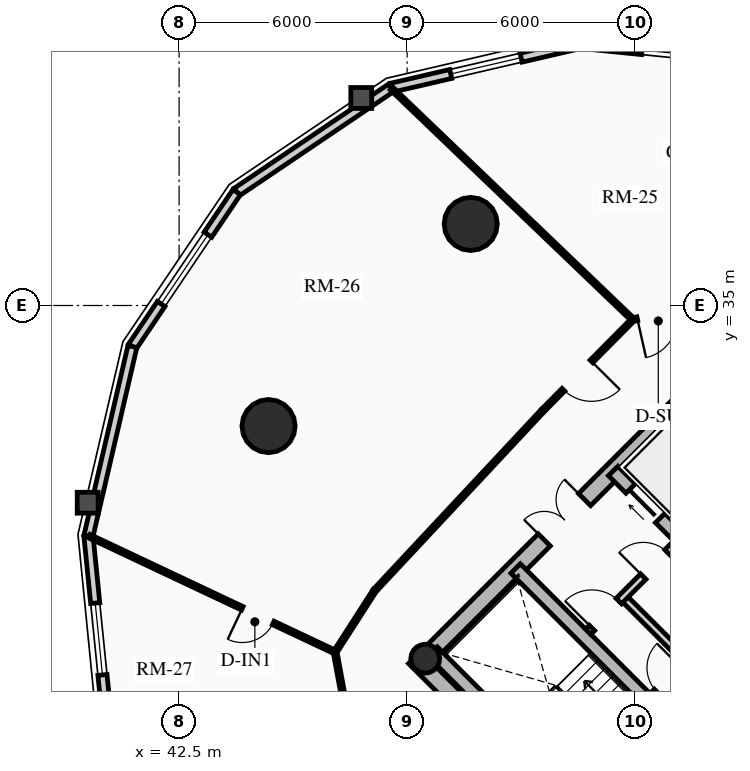
"""IFC4 building model, lengths in metres.
Left out: names, types, materials, properties, quantities, classifications, styles, units other than length and angle.
Written with IfcOpenShell. Run it as: python <this file> out.ifc"""

import sys

from ifc_helpers import new_model, si_unit, direction, frame, frame_2d, origin, origin_2d, place, context, subcontext, project, spatial, rectangle, circle, hollow_circle, extrude, source, transform, mapped, element, fill, save


model = new_model("IFC4")
c1 = context("Model", 3, precision=1e-05, world=origin(), true_north=direction((0.0, 1.0)))
c2 = subcontext(c1, "Body", "Model", "MODEL_VIEW")
j1 = project(units=[si_unit("LENGTHUNIT", "METRE"), si_unit("PLANEANGLEUNIT", "RADIAN")], contexts=[c1])
p1 = place(None, origin())
s1 = spatial("IfcSite", under=j1, at=p1, CompositionType="ELEMENT")
p2 = place(p1, origin())
s2 = spatial("IfcBuilding", under=s1, at=p2, CompositionType="ELEMENT")
p3 = place(p2, frame((0.0, 0.0, 99.25)))
s3 = spatial("IfcBuildingStorey", under=s2, at=p3, CompositionType="ELEMENT", Elevation=99.25)
p4 = place(p3, frame((58.737, 15.697, 0.0), z_axis=(0.0, 0.0, 1.0), x_axis=(-0.707106781187, 0.707106781187, 0.0)))
e1 = element("IfcWall", 1, at=p4, inside=s3, PredefinedType="SHEAR", context=c2, shape_type="SweptSolid", body=[
    extrude(rectangle(XDim=14.2, YDim=0.45, at=frame_2d((7.1, 0.0))), origin(), (0.0, 0.0, 1.0), 2.91),
])
p5 = place(p3, frame((48.856, 25.578, 0.0), z_axis=(0.0, 0.0, 1.0), x_axis=(0.707106781187, 0.707106781187, 0.0)))
e2 = element("IfcWall", 2, at=p5, inside=s3, PredefinedType="SHEAR", context=c2, shape_type="SweptSolid", body=[
    extrude(rectangle(XDim=10.7, YDim=0.45, at=frame_2d((5.35, 0.0))), origin(), (0.0, 0.0, 1.0), 2.91),
])
m1 = source(origin(), c2, "Body", "SweptSolid", [
    extrude(rectangle(XDim=1.5, YDim=2.02, at=frame_2d((0.75, 1.01))), frame((0.0, 0.235, 0.0), z_axis=(0.0, -1.0, 0.0), x_axis=(1.0, 0.0, 0.0)), (0.0, 0.0, 1.0), 0.47),
])
p6 = place(p5, frame((4.6, 0.0, 0.0)))
e3 = element("IfcOpeningElement", 3, at=p6, cuts=e2, PredefinedType="OPENING", context=c2, shape_type="MappedRepresentation", body=[
    mapped(m1, transform((0.0, 0.0, 0.0), x_axis=(1.0, 0.0, 0.0), y_axis=(0.0, 1.0, 0.0), z_axis=(0.0, 0.0, 1.0), scale=1.0)),
])
p7 = place(p3, frame((61.078, 18.355, 0.0), z_axis=(0.0, 0.0, 1.0), x_axis=(-0.707106781187, 0.707106781187, 0.0)))
e4 = element("IfcWall", 4, at=p7, inside=s3, PredefinedType="SHEAR", context=c2, shape_type="SweptSolid", body=[
    extrude(rectangle(XDim=13.75, YDim=0.35, at=frame_2d((6.875, 0.0))), origin(), (0.0, 0.0, 1.0), 2.91),
])
m2 = source(origin(), c2, "Body", "SweptSolid", [
    extrude(rectangle(XDim=1.1, YDim=2.015, at=frame_2d((0.55, 1.007))), frame((0.0, 0.185, 0.0), z_axis=(0.0, -1.0, 0.0), x_axis=(1.0, 0.0, 0.0)), (0.0, 0.0, 1.0), 0.37),
])
p8 = place(p7, frame((4.875, 0.0, 0.0)))
e5 = element("IfcOpeningElement", 5, at=p8, cuts=e4, PredefinedType="OPENING", context=c2, shape_type="MappedRepresentation", body=[
    mapped(m2, transform((0.0, 0.0, 0.0), x_axis=(1.0, 0.0, 0.0), y_axis=(0.0, 1.0, 0.0), z_axis=(0.0, 0.0, 1.0), scale=1.0)),
])
m3 = source(origin(), c2, "Body", "SweptSolid", [
    extrude(rectangle(XDim=1.15, YDim=2.02, at=frame_2d((0.575, 1.01))), frame((0.0, 0.185, 0.0), z_axis=(0.0, -1.0, 0.0), x_axis=(1.0, 0.0, 0.0)), (0.0, 0.0, 1.0), 0.37),
])
p9 = place(p7, frame((7.295, 0.0, 0.0)))
e6 = element("IfcOpeningElement", 6, at=p9, cuts=e4, PredefinedType="OPENING", context=c2, shape_type="MappedRepresentation", body=[
    mapped(m3, transform((0.0, 0.0, 0.0), x_axis=(1.0, 0.0, 0.0), y_axis=(0.0, 1.0, 0.0), z_axis=(0.0, 0.0, 1.0), scale=1.0)),
])
p10 = place(p3, frame((63.645, 20.922, 0.0), z_axis=(0.0, 0.0, 1.0), x_axis=(-0.707106781187, 0.707106781187, 0.0)))
e7 = element("IfcWall", 7, at=p10, inside=s3, PredefinedType="SHEAR", context=c2, shape_type="SweptSolid", body=[
    extrude(rectangle(XDim=13.75, YDim=0.35, at=frame_2d((6.875, 0.0))), origin(), (0.0, 0.0, 1.0), 2.91),
])
p11 = place(p10, frame((10.0, 0.0, 0.0)))
e8 = element("IfcOpeningElement", 8, at=p11, cuts=e7, PredefinedType="OPENING", context=c2, shape_type="MappedRepresentation", body=[
    mapped(m2, transform((0.0, 0.0, 0.0), x_axis=(1.0, 0.0, 0.0), y_axis=(0.0, 1.0, 0.0), z_axis=(0.0, 0.0, 1.0), scale=1.0)),
])
p12 = place(p10, frame((12.0, 0.0, 0.0)))
e9 = element("IfcOpeningElement", 9, at=p12, cuts=e7, PredefinedType="OPENING", context=c2, shape_type="MappedRepresentation", body=[
    mapped(m2, transform((0.0, 0.0, 0.0), x_axis=(1.0, 0.0, 0.0), y_axis=(0.0, 1.0, 0.0), z_axis=(0.0, 0.0, 1.0), scale=1.0)),
])
p13 = place(p10, frame((5.305, 0.0, 0.0)))
e10 = element("IfcOpeningElement", 10, at=p13, cuts=e7, PredefinedType="OPENING", context=c2, shape_type="MappedRepresentation", body=[
    mapped(m3, transform((0.0, 0.0, 0.0), x_axis=(1.0, 0.0, 0.0), y_axis=(0.0, 1.0, 0.0), z_axis=(0.0, 0.0, 1.0), scale=1.0)),
])
p14 = place(p3, frame((53.922, 21.141, 0.0), z_axis=(0.0, 0.0, 1.0), x_axis=(-0.707088616009, 0.707124945897, 0.0)))
e11 = element("IfcWall", 11, at=p14, inside=s3, PredefinedType="SHEAR", context=c2, shape_type="SweptSolid", body=[
    extrude(rectangle(XDim=6.72, YDim=0.35, at=frame_2d((3.36, 0.0))), origin(), (0.0, 0.0, 1.0), 2.91),
])
p15 = place(p3, frame((48.976, 25.706, 0.0), z_axis=(0.0, 0.0, 1.0), x_axis=(0.707106781187, 0.707106781187, 0.0)))
e12 = element("IfcColumn", 12, at=p15, inside=s3, PredefinedType="COLUMN", context=c2, shape_type="SweptSolid", body=[
    extrude(hollow_circle(Radius=0.38, WallThickness=0.032, at=origin_2d()), origin(), (0.0, 0.0, 1.0), 2.91),
])
for number, where, z_axis, x_axis in (
    (13, (50.173, 37.146, 0.0), (0.0, 0.0, 1.0), (1.0, 0.0, 0.0)),
    (14, (44.854, 31.827, 0.0), (0.0, 0.0, 1.0), (1.0, 0.0, 0.0)),
):
    element("IfcColumn", number, at=place(p3, frame(where, z_axis=z_axis, x_axis=x_axis)), inside=s3, PredefinedType="USERDEFINED", context=c2, shape_type="SweptSolid", body=[
        extrude(circle(Radius=0.7, at=origin_2d()), origin(), (0.0, 0.0, 1.0), 2.91),
    ])
p16 = place(p3, frame((53.067, 41.885, 0.0), z_axis=(0.0, 0.0, 1.0), x_axis=(0.994971754311, -0.10015591906, 0.0)))
e15 = element("IfcWall", 15, at=p16, inside=s3, PredefinedType="SOLIDWALL", context=c2, shape_type="SweptSolid", body=[
    extrude(rectangle(XDim=5.448, YDim=0.24, at=frame_2d((2.724, 0.0))), origin(), (0.0, 0.0, 1.0), 2.179),
])
m4 = source(origin(), c2, "Body", "SweptSolid", [
    extrude(rectangle(XDim=2.2, YDim=1.35, at=frame_2d((1.1, 0.675))), frame((0.0, 0.13, 0.0), z_axis=(0.0, -1.0, 0.0), x_axis=(1.0, 0.0, 0.0)), (0.0, 0.0, 1.0), 0.26),
])
p17 = place(p16, frame((1.624, 0.0, 0.65)))
e16 = element("IfcOpeningElement", 16, at=p17, cuts=e15, PredefinedType="OPENING", context=c2, shape_type="MappedRepresentation", body=[
    mapped(m4, transform((0.0, 0.0, 0.0), x_axis=(1.0, 0.0, 0.0), y_axis=(0.0, 1.0, 0.0), z_axis=(0.0, 0.0, 1.0), scale=1.0)),
])
p18 = place(p3, frame((48.08, 40.729, 0.0), z_axis=(0.0, 0.0, 1.0), x_axis=(0.974165631126, 0.225834725257, 0.0)))
e17 = element("IfcWall", 17, at=p18, inside=s3, PredefinedType="SOLIDWALL", context=c2, shape_type="SweptSolid", body=[
    extrude(rectangle(XDim=5.119, YDim=0.24, at=frame_2d((2.56, 0.0))), origin(), (0.0, 0.0, 1.0), 2.179),
])
m5 = source(origin(), c2, "Body", "SweptSolid", [
    extrude(rectangle(XDim=1.9, YDim=1.35, at=frame_2d((0.95, 0.675))), frame((0.0, 0.13, 0.0), z_axis=(0.0, -1.0, 0.0), x_axis=(1.0, 0.0, 0.0)), (0.0, 0.0, 1.0), 0.26),
])
p19 = place(p18, frame((1.609, 0.0, 0.65)))
e18 = element("IfcOpeningElement", 18, at=p19, cuts=e17, PredefinedType="OPENING", context=c2, shape_type="MappedRepresentation", body=[
    mapped(m5, transform((0.0, 0.0, 0.0), x_axis=(1.0, 0.0, 0.0), y_axis=(0.0, 1.0, 0.0), z_axis=(0.0, 0.0, 1.0), scale=1.0)),
])
p20 = place(p3, frame((44.015, 37.985, 0.0), z_axis=(0.0, 0.0, 1.0), x_axis=(0.828781148131, 0.559572880421, 0.0)))
e19 = element("IfcWall", 19, at=p20, inside=s3, PredefinedType="SOLIDWALL", context=c2, shape_type="SweptSolid", body=[
    extrude(rectangle(XDim=4.905, YDim=0.24, at=frame_2d((2.452, 0.0))), origin(), (0.0, 0.0, 1.0), 2.179),
])
p21 = place(p3, frame((41.271, 33.92, 0.0), z_axis=(0.0, 0.0, 1.0), x_axis=(0.559572880421, 0.828781148131, 0.0)))
e20 = element("IfcWall", 20, at=p21, inside=s3, PredefinedType="SOLIDWALL", context=c2, shape_type="SweptSolid", body=[
    extrude(rectangle(XDim=4.905, YDim=0.24, at=frame_2d((2.452, 0.0))), origin(), (0.0, 0.0, 1.0), 2.179),
])
p22 = place(p21, frame((1.352, 0.0, 0.65)))
e21 = element("IfcOpeningElement", 21, at=p22, cuts=e20, PredefinedType="OPENING", context=c2, shape_type="MappedRepresentation", body=[
    mapped(m4, transform((0.0, 0.0, 0.0), x_axis=(1.0, 0.0, 0.0), y_axis=(0.0, 1.0, 0.0), z_axis=(0.0, 0.0, 1.0), scale=1.0)),
])
p23 = place(p3, frame((40.115, 28.933, 0.0), z_axis=(0.0, 0.0, 1.0), x_axis=(0.225834725257, 0.974165631126, 0.0)))
e22 = element("IfcWall", 22, at=p23, inside=s3, PredefinedType="SOLIDWALL", context=c2, shape_type="SweptSolid", body=[
    extrude(rectangle(XDim=5.119, YDim=0.24, at=frame_2d((2.56, 0.0))), origin(), (0.0, 0.0, 1.0), 2.179),
])
p24 = place(p3, frame((40.661, 23.513, 0.0), z_axis=(0.0, 0.0, 1.0), x_axis=(-0.10015591906, 0.994971754311, 0.0)))
e23 = element("IfcWall", 23, at=p24, inside=s3, PredefinedType="SOLIDWALL", context=c2, shape_type="SweptSolid", body=[
    extrude(rectangle(XDim=5.448, YDim=0.24, at=frame_2d((2.724, 0.0))), origin(), (0.0, 0.0, 1.0), 2.179),
])
p25 = place(p24, frame((1.774, 0.0, 0.65)))
e24 = element("IfcOpeningElement", 24, at=p25, cuts=e23, PredefinedType="OPENING", context=c2, shape_type="MappedRepresentation", body=[
    mapped(m5, transform((0.0, 0.0, 0.0), x_axis=(1.0, 0.0, 0.0), y_axis=(0.0, 1.0, 0.0), z_axis=(0.0, 0.0, 1.0), scale=1.0)),
])
p26 = place(p3, frame((54.961, 24.719, 0.0), z_axis=(0.0, 0.0, 1.0), x_axis=(0.707106781187, 0.707106781187, 0.0)))
e25 = element("IfcWall", 25, at=p26, inside=s3, PredefinedType="PARTITIONING", context=c2, shape_type="SweptSolid", body=[
    extrude(rectangle(XDim=3.28, YDim=0.2, at=frame_2d((1.64, 0.0))), origin(), (0.0, 0.0, 1.0), 2.655),
])
m6 = source(origin(), c2, "Body", "SweptSolid", [
    extrude(rectangle(XDim=0.9, YDim=2.005, at=frame_2d((0.45, 1.002))), frame((0.0, 0.11, 0.0), z_axis=(0.0, -1.0, 0.0), x_axis=(1.0, 0.0, 0.0)), (0.0, 0.0, 1.0), 0.22),
])
p27 = place(p26, frame((0.16, 0.0, 0.0)))
e26 = element("IfcOpeningElement", 26, at=p27, cuts=e25, PredefinedType="OPENING", context=c2, shape_type="MappedRepresentation", body=[
    mapped(m6, transform((0.0, 0.0, 0.0), x_axis=(1.0, 0.0, 0.0), y_axis=(0.0, 1.0, 0.0), z_axis=(0.0, 0.0, 1.0), scale=1.0)),
])
p28 = place(p3, frame((55.874, 25.631, 0.0), z_axis=(0.0, 0.0, 1.0), x_axis=(-0.707157639372, 0.707055919343, 0.0)))
e27 = element("IfcWall", 27, at=p28, inside=s3, PredefinedType="PARTITIONING", context=c2, shape_type="SweptSolid", body=[
    extrude(rectangle(XDim=2.4, YDim=0.2, at=frame_2d((1.2, 0.0))), origin(), (0.0, 0.0, 1.0), 2.655),
])
p29 = place(p3, frame((53.264, 26.416, 0.0), z_axis=(0.0, 0.0, 1.0), x_axis=(0.707106781187, 0.707106781187, 0.0)))
e28 = element("IfcWall", 28, at=p29, inside=s3, PredefinedType="PARTITIONING", context=c2, shape_type="SweptSolid", body=[
    extrude(rectangle(XDim=3.28, YDim=0.2, at=frame_2d((1.64, 0.0))), origin(), (0.0, 0.0, 1.0), 2.655),
])
m7 = source(origin(), c2, "Body", "SweptSolid", [
    extrude(rectangle(XDim=1.0, YDim=2.015, at=frame_2d((0.5, 1.007))), frame((0.0, 0.11, 0.0), z_axis=(0.0, -1.0, 0.0), x_axis=(1.0, 0.0, 0.0)), (0.0, 0.0, 1.0), 0.22),
])
p30 = place(p29, frame((0.14, 0.0, 0.0)))
e29 = element("IfcOpeningElement", 29, at=p30, cuts=e28, PredefinedType="OPENING", context=c2, shape_type="MappedRepresentation", body=[
    mapped(m7, transform((0.0, 0.0, 0.0), x_axis=(1.0, 0.0, 0.0), y_axis=(0.0, 1.0, 0.0), z_axis=(0.0, 0.0, 1.0), scale=1.0)),
])
p31 = place(p29, frame((2.05, 0.0, 0.0)))
e30 = element("IfcOpeningElement", 30, at=p31, cuts=e28, PredefinedType="OPENING", context=c2, shape_type="MappedRepresentation", body=[
    mapped(m6, transform((0.0, 0.0, 0.0), x_axis=(1.0, 0.0, 0.0), y_axis=(0.0, 1.0, 0.0), z_axis=(0.0, 0.0, 1.0), scale=1.0)),
])
p32 = place(p3, frame((55.988, 34.974, 0.0), z_axis=(0.0, 0.0, 1.0), x_axis=(-0.975666565154, -0.219259557695, 0.0)))
e31 = element("IfcWall", 31, at=p32, inside=s3, PredefinedType="MOVABLE", context=c2, shape_type="SweptSolid", body=[
    extrude(rectangle(XDim=1.587, YDim=0.1, at=frame_2d((0.793, 0.0))), origin(), (0.0, 0.0, 1.0), 2.225),
])
m8 = source(origin(), c2, "Body", "SweptSolid", [
    extrude(rectangle(XDim=1.05, YDim=2.015, at=frame_2d((0.525, 1.007))), frame((0.0, 0.06, 0.0), z_axis=(0.0, -1.0, 0.0), x_axis=(1.0, 0.0, 0.0)), (0.0, 0.0, 1.0), 0.12),
])
p33 = place(p32, frame((0.417, 0.0, 0.0)))
e32 = element("IfcOpeningElement", 32, at=p33, cuts=e31, PredefinedType="OPENING", context=c2, shape_type="MappedRepresentation", body=[
    mapped(m8, transform((0.0, 0.0, 0.0), x_axis=(1.0, 0.0, 0.0), y_axis=(0.0, 1.0, 0.0), z_axis=(0.0, 0.0, 1.0), scale=1.0)),
])
p34 = place(p3, frame((54.44, 34.626, 0.0), z_axis=(0.0, 0.0, 1.0), x_axis=(-0.703978840546, -0.710220945948, 0.0)))
e33 = element("IfcWall", 33, at=p34, inside=s3, PredefinedType="MOVABLE", context=c2, shape_type="SweptSolid", body=[
    extrude(rectangle(XDim=3.364, YDim=0.1, at=frame_2d((1.682, 0.0))), origin(), (0.0, 0.0, 1.0), 2.225),
])
p35 = place(p34, frame((1.546, 0.0, 0.0)))
e34 = element("IfcOpeningElement", 34, at=p35, cuts=e33, PredefinedType="OPENING", context=c2, shape_type="MappedRepresentation", body=[
    mapped(m8, transform((0.0, 0.0, 0.0), x_axis=(1.0, 0.0, 0.0), y_axis=(0.0, 1.0, 0.0), z_axis=(0.0, 0.0, 1.0), scale=1.0)),
])
p36 = place(p3, frame((52.072, 32.237, 0.0), z_axis=(0.0, 0.0, 1.0), x_axis=(-0.682528774423, -0.730858722383, 0.0)))
e35 = element("IfcWall", 35, at=p36, inside=s3, PredefinedType="MOVABLE", context=c2, shape_type="SweptSolid", body=[
    extrude(rectangle(XDim=6.486, YDim=0.1, at=frame_2d((3.243, 0.0))), origin(), (0.0, 0.0, 1.0), 2.225),
])
p37 = place(p3, frame((47.645, 27.497, 0.0), z_axis=(0.0, 0.0, 1.0), x_axis=(-0.540680612097, -0.841227957038, 0.0)))
e36 = element("IfcWall", 36, at=p37, inside=s3, PredefinedType="MOVABLE", context=c2, shape_type="SweptSolid", body=[
    extrude(rectangle(XDim=1.924, YDim=0.1, at=frame_2d((0.962, 0.0))), origin(), (0.0, 0.0, 1.0), 2.225),
])
p38 = place(p3, frame((46.605, 25.879, 0.0), z_axis=(0.0, 0.0, 1.0), x_axis=(0.182019785456, -0.983294868136, 0.0)))
e37 = element("IfcWall", 37, at=p38, inside=s3, PredefinedType="MOVABLE", context=c2, shape_type="SweptSolid", body=[
    extrude(rectangle(XDim=1.384, YDim=0.1, at=frame_2d((0.692, 0.0))), origin(), (0.0, 0.0, 1.0), 2.225),
])
p39 = place(p3, frame((54.44, 34.626, 0.0), z_axis=(0.0, 0.0, 1.0), x_axis=(-0.722045979822, 0.691845071547, 0.0)))
e38 = element("IfcWall", 38, at=p39, inside=s3, PredefinedType="MOVABLE", context=c2, shape_type="SweptSolid", body=[
    extrude(rectangle(XDim=8.795, YDim=0.1, at=frame_2d((4.397, 0.0))), origin(), (0.0, 0.0, 1.0), 2.179),
])
p40 = place(p3, frame((46.605, 25.879, 0.0), z_axis=(0.0, 0.0, 1.0), x_axis=(-0.904450971726, 0.426577589359, 0.0)))
e39 = element("IfcWall", 39, at=p40, inside=s3, PredefinedType="MOVABLE", context=c2, shape_type="SweptSolid", body=[
    extrude(rectangle(XDim=7.154, YDim=0.1, at=frame_2d((3.577, 0.0))), origin(), (0.0, 0.0, 1.0), 2.179),
])
m9 = source(origin(), c2, "Body", "SweptSolid", [
    extrude(rectangle(XDim=0.9, YDim=2.005, at=frame_2d((0.45, 1.002))), frame((0.0, 0.06, 0.0), z_axis=(0.0, -1.0, 0.0), x_axis=(1.0, 0.0, 0.0)), (0.0, 0.0, 1.0), 0.12),
])
p41 = place(p40, frame((1.8, 0.0, 0.0)))
e40 = element("IfcOpeningElement", 40, at=p41, cuts=e39, PredefinedType="OPENING", context=c2, shape_type="MappedRepresentation", body=[
    mapped(m9, transform((0.0, 0.0, 0.0), x_axis=(1.0, 0.0, 0.0), y_axis=(0.0, 1.0, 0.0), z_axis=(0.0, 0.0, 1.0), scale=1.0)),
])
m10 = source(origin(), c2, "Body", "SweptSolid", [
    extrude(rectangle(XDim=2.2, YDim=1.35, at=frame_2d((1.1, 0.675))), frame((0.0, 0.03, 0.0), z_axis=(0.0, -1.0, 0.0), x_axis=(1.0, 0.0, 0.0)), (0.0, 0.0, 1.0), 0.06),
])
p42 = place(p17, origin())
e41 = element("IfcWindow", 41, at=p42, inside=s3, PartitioningType="DOUBLE_PANEL_VERTICAL", PredefinedType="WINDOW", context=c2, shape_type="MappedRepresentation", body=[
    mapped(m10, transform((0.0, 0.0, 0.0), x_axis=(1.0, 0.0, 0.0), y_axis=(0.0, 1.0, 0.0), z_axis=(0.0, 0.0, 1.0), scale=1.0)),
])
fill(e16, e41)
m11 = source(origin(), c2, "Body", "SweptSolid", [
    extrude(rectangle(XDim=1.9, YDim=1.35, at=frame_2d((0.95, 0.675))), frame((0.0, 0.03, 0.0), z_axis=(0.0, -1.0, 0.0), x_axis=(1.0, 0.0, 0.0)), (0.0, 0.0, 1.0), 0.06),
])
p43 = place(p19, origin())
e42 = element("IfcWindow", 42, at=p43, inside=s3, PartitioningType="DOUBLE_PANEL_VERTICAL", PredefinedType="WINDOW", context=c2, shape_type="MappedRepresentation", body=[
    mapped(m11, transform((0.0, 0.0, 0.0), x_axis=(1.0, 0.0, 0.0), y_axis=(0.0, 1.0, 0.0), z_axis=(0.0, 0.0, 1.0), scale=1.0)),
])
fill(e18, e42)
p44 = place(p22, origin())
e43 = element("IfcWindow", 43, at=p44, inside=s3, PartitioningType="DOUBLE_PANEL_VERTICAL", PredefinedType="WINDOW", context=c2, shape_type="MappedRepresentation", body=[
    mapped(m10, transform((0.0, 0.0, 0.0), x_axis=(1.0, 0.0, 0.0), y_axis=(0.0, 1.0, 0.0), z_axis=(0.0, 0.0, 1.0), scale=1.0)),
])
fill(e21, e43)
p45 = place(p25, origin())
e44 = element("IfcWindow", 44, at=p45, inside=s3, PartitioningType="DOUBLE_PANEL_VERTICAL", PredefinedType="WINDOW", context=c2, shape_type="MappedRepresentation", body=[
    mapped(m11, transform((0.0, 0.0, 0.0), x_axis=(1.0, 0.0, 0.0), y_axis=(0.0, 1.0, 0.0), z_axis=(0.0, 0.0, 1.0), scale=1.0)),
])
fill(e24, e44)
m12 = source(origin(), c2, "Body", "SweptSolid", [
    extrude(rectangle(XDim=1.1, YDim=2.015, at=frame_2d((0.55, 1.007))), frame((0.0, 0.025, 0.0), z_axis=(0.0, -1.0, 0.0), x_axis=(1.0, 0.0, 0.0)), (0.0, 0.0, 1.0), 0.05),
])
p46 = place(p12, origin())
e45 = element("IfcDoor", 45, at=p46, inside=s3, OperationType="SLIDING_TO_RIGHT", PredefinedType="DOOR", context=c2, shape_type="MappedRepresentation", body=[
    mapped(m12, transform((0.0, 0.0, 0.0), x_axis=(1.0, 0.0, 0.0), y_axis=(0.0, 1.0, 0.0), z_axis=(0.0, 0.0, 1.0), scale=1.0)),
])
fill(e9, e45)
m13 = source(origin(), c2, "Body", "SweptSolid", [
    extrude(rectangle(XDim=1.5, YDim=2.02, at=frame_2d((0.75, 1.01))), frame((0.0, 0.025, 0.0), z_axis=(0.0, -1.0, 0.0), x_axis=(1.0, 0.0, 0.0)), (0.0, 0.0, 1.0), 0.05),
])
p47 = place(p6, origin())
e46 = element("IfcDoor", 46, at=p47, inside=s3, OperationType="DOUBLE_DOOR_SINGLE_SWING", PredefinedType="DOOR", context=c2, shape_type="MappedRepresentation", body=[
    mapped(m13, transform((0.0, 0.0, 0.0), x_axis=(1.0, 0.0, 0.0), y_axis=(0.0, 1.0, 0.0), z_axis=(0.0, 0.0, 1.0), scale=1.0)),
])
fill(e3, e46)
m14 = source(origin(), c2, "Body", "SweptSolid", [
    extrude(rectangle(XDim=0.9, YDim=2.005, at=frame_2d((0.45, 1.002))), frame((0.0, 0.025, 0.0), z_axis=(0.0, -1.0, 0.0), x_axis=(1.0, 0.0, 0.0)), (0.0, 0.0, 1.0), 0.05),
])
p48 = place(p27, origin())
e47 = element("IfcDoor", 47, at=p48, inside=s3, OperationType="SINGLE_SWING_RIGHT", PredefinedType="DOOR", context=c2, shape_type="MappedRepresentation", body=[
    mapped(m14, transform((0.0, 0.0, 0.0), x_axis=(1.0, 0.0, 0.0), y_axis=(0.0, 1.0, 0.0), z_axis=(0.0, 0.0, 1.0), scale=1.0)),
])
fill(e26, e47)
m15 = source(origin(), c2, "Body", "SweptSolid", [
    extrude(rectangle(XDim=1.0, YDim=2.015, at=frame_2d((0.5, 1.007))), frame((0.0, 0.025, 0.0), z_axis=(0.0, -1.0, 0.0), x_axis=(1.0, 0.0, 0.0)), (0.0, 0.0, 1.0), 0.05),
])
p49 = place(p30, origin())
e48 = element("IfcDoor", 48, at=p49, inside=s3, OperationType="SINGLE_SWING_LEFT", PredefinedType="DOOR", context=c2, shape_type="MappedRepresentation", body=[
    mapped(m15, transform((0.0, 0.0, 0.0), x_axis=(1.0, 0.0, 0.0), y_axis=(0.0, 1.0, 0.0), z_axis=(0.0, 0.0, 1.0), scale=1.0)),
])
fill(e29, e48)
p50 = place(p31, origin())
e49 = element("IfcDoor", 49, at=p50, inside=s3, OperationType="SINGLE_SWING_LEFT", PredefinedType="DOOR", context=c2, shape_type="MappedRepresentation", body=[
    mapped(m14, transform((0.0, 0.0, 0.0), x_axis=(1.0, 0.0, 0.0), y_axis=(0.0, 1.0, 0.0), z_axis=(0.0, 0.0, 1.0), scale=1.0)),
])
fill(e30, e49)
m16 = source(origin(), c2, "Body", "SweptSolid", [
    extrude(rectangle(XDim=1.05, YDim=2.015, at=frame_2d((0.525, 1.007))), frame((0.0, 0.025, 0.0), z_axis=(0.0, -1.0, 0.0), x_axis=(1.0, 0.0, 0.0)), (0.0, 0.0, 1.0), 0.05),
])
p51 = place(p33, origin())
e50 = element("IfcDoor", 50, at=p51, inside=s3, OperationType="SINGLE_SWING_RIGHT", PredefinedType="DOOR", context=c2, shape_type="MappedRepresentation", body=[
    mapped(m16, transform((0.0, 0.0, 0.0), x_axis=(1.0, 0.0, 0.0), y_axis=(0.0, 1.0, 0.0), z_axis=(0.0, 0.0, 1.0), scale=1.0)),
])
fill(e32, e50)
p52 = place(p35, origin())
e51 = element("IfcDoor", 51, at=p52, inside=s3, OperationType="SINGLE_SWING_LEFT", PredefinedType="DOOR", context=c2, shape_type="MappedRepresentation", body=[
    mapped(m16, transform((0.0, 0.0, 0.0), x_axis=(1.0, 0.0, 0.0), y_axis=(0.0, 1.0, 0.0), z_axis=(0.0, 0.0, 1.0), scale=1.0)),
])
fill(e34, e51)
p53 = place(p41, origin())
e52 = element("IfcDoor", 52, at=p53, inside=s3, OperationType="SINGLE_SWING_RIGHT", PredefinedType="DOOR", context=c2, shape_type="MappedRepresentation", body=[
    mapped(m14, transform((0.0, 0.0, 0.0), x_axis=(1.0, 0.0, 0.0), y_axis=(0.0, 1.0, 0.0), z_axis=(0.0, 0.0, 1.0), scale=1.0)),
])
fill(e40, e52)
save(model, sys.argv[1])
